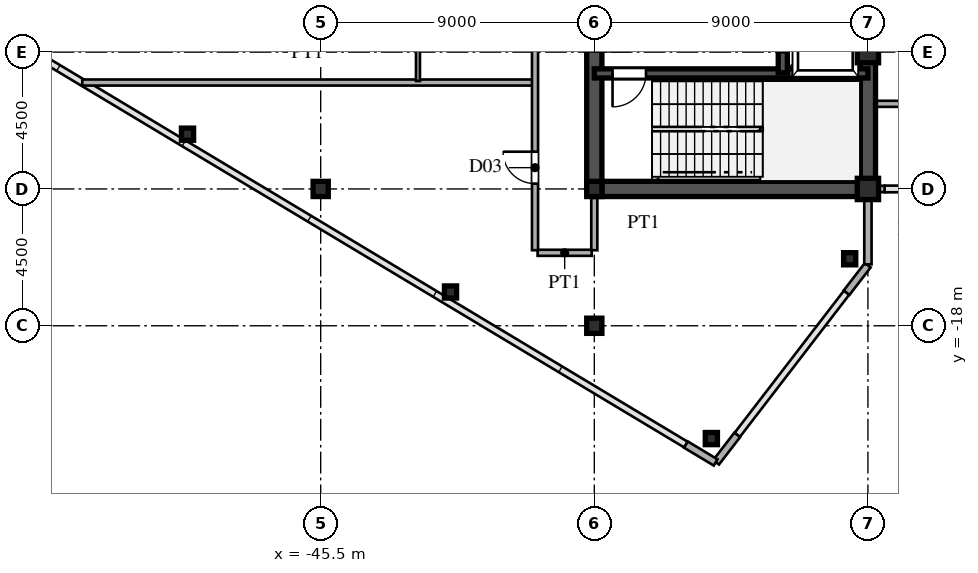
"""IFC4 building model, lengths in metres.
Left out: names, types, materials, properties, quantities, classifications, styles, units other than length and angle.
Written with IfcOpenShell. Run it as: python <this file> out.ifc"""

import sys

from ifc_helpers import new_model, si_unit, direction, frame, frame_2d, origin, origin_2d, place, context, subcontext, project, spatial, rectangle, hollow_rectangle, i_section, extrude, source, transform, mapped, element, fill, save


model = new_model("IFC4")
c1 = context("Model", 3, precision=1e-05, world=origin(), true_north=direction((0.0, 1.0)))
c2 = subcontext(c1, "Body", "Model", "MODEL_VIEW")
j1 = project(units=[si_unit("LENGTHUNIT", "METRE"), si_unit("PLANEANGLEUNIT", "RADIAN")], contexts=[c1])
p1 = place(None, origin())
s1 = spatial("IfcSite", under=j1, at=p1, CompositionType="ELEMENT")
p2 = place(p1, origin())
s2 = spatial("IfcBuilding", under=s1, at=p2, CompositionType="ELEMENT")
p3 = place(p2, frame((0.0, 0.0, 234.6)))
s3 = spatial("IfcBuildingStorey", under=s2, at=p3, CompositionType="ELEMENT", Elevation=234.6)
m1 = source(origin(), c2, "Body", "SweptSolid", [
    extrude(hollow_rectangle(XDim=0.7, YDim=0.7, WallThickness=0.03, at=origin_2d()), origin(), (0.0, 0.0, 1.0), 4.8),
])
for number, where, z_axis, x_axis in (
    (1, (-27.5, -13.5, 0.0), (0.0, 0.0, 1.0), (1.0, 0.0, 0.0)),
    (2, (-27.5, -9.0, 0.0), (0.0, 0.0, 1.0), (1.0, 0.0, 0.0)),
):
    element("IfcColumn", number, at=place(p3, frame(where, z_axis=z_axis, x_axis=x_axis)), inside=s3, PredefinedType="COLUMN", context=c2, shape_type="MappedRepresentation", body=[
        mapped(m1, transform((0.0, 0.0, 0.0), scale=1.0)),
    ])
m2 = source(origin(), c2, "Body", "SweptSolid", [
    extrude(i_section(OverallWidth=0.5, OverallDepth=0.5, WebThickness=0.02, FlangeThickness=0.032, at=origin_2d()), origin(), (0.0, 0.0, 1.0), 4.8),
])
for number, where, z_axis, x_axis in (
    (3, (-36.5, -18.0, 0.0), (0.0, 0.0, 1.0), (1.0, 0.0, 0.0)),
    (4, (-36.5, -13.5, 0.0), (0.0, 0.0, 1.0), (1.0, 0.0, 0.0)),
    (5, (-45.5, -13.5, 0.0), (0.0, 0.0, 1.0), (1.0, 0.0, 0.0)),
):
    element("IfcColumn", number, at=place(p3, frame(where, z_axis=z_axis, x_axis=x_axis)), inside=s3, PredefinedType="COLUMN", context=c2, shape_type="MappedRepresentation", body=[
        mapped(m2, transform((0.0, 0.0, 0.0), scale=1.0)),
    ])
m3 = source(origin(), c2, "Body", "SweptSolid", [
    extrude(hollow_rectangle(XDim=0.4, YDim=0.4, WallThickness=0.016, at=origin_2d()), origin(), (0.0, 0.0, 1.0), 4.8),
])
for number, where, z_axis, x_axis in (
    (6, (-28.1, -15.796, 0.0), (0.0, 0.0, 1.0), (1.0, 0.0, 0.0)),
    (7, (-32.65, -21.71, 0.0), (0.0, 0.0, 1.0), (1.0, 0.0, 0.0)),
    (8, (-41.23, -16.889, 0.0), (0.0, 0.0, 1.0), (1.0, 0.0, 0.0)),
    (9, (-49.88, -11.699, 0.0), (0.0, 0.0, 1.0), (1.0, 0.0, 0.0)),
):
    element("IfcColumn", number, at=place(p3, frame(where, z_axis=z_axis, x_axis=x_axis)), inside=s3, PredefinedType="COLUMN", context=c2, shape_type="MappedRepresentation", body=[
        mapped(m3, transform((0.0, 0.0, 0.0), scale=1.0)),
    ])
p4 = place(p3, frame((-27.5, -15.98, 0.0), z_axis=(0.0, 0.0, 1.0), x_axis=(0.0, 1.0, 0.0)))
e10 = element("IfcWall", 10, at=p4, inside=s3, PredefinedType="SOLIDWALL", context=c2, shape_type="SweptSolid", body=[
    extrude(rectangle(XDim=1.605, YDim=0.24, at=frame_2d((0.803, 0.0))), origin(), (0.0, 0.0, 1.0), 4.58),
])
p5 = place(p3, frame((-27.5, -14.375, 0.0), z_axis=(0.0, 0.0, 1.0), x_axis=(0.0, 1.0, 0.0)))
e11 = element("IfcWall", 11, at=p5, inside=s3, PredefinedType="SOLIDWALL", context=c2, shape_type="SweptSolid", body=[
    extrude(rectangle(XDim=0.62, YDim=0.24, at=frame_2d((0.31, 0.0))), origin(), (0.0, 0.0, 1.0), 4.08),
])
for number, where, z_axis, x_axis in (
    (12, (-33.486, -21.908, 0.0), (0.0, 0.0, 1.0), (0.857, -0.515, 0.0)),
    (13, (-32.494, -22.492, 0.0), (0.0, 0.0, 1.0), (0.61, 0.793, 0.0)),
    (14, (-28.201, -16.912, 0.0), (0.0, 0.0, 1.0), (0.61, 0.793, 0.0)),
):
    element("IfcWall", number, at=place(p3, frame(where, z_axis=z_axis, x_axis=x_axis)), inside=s3, PredefinedType="SOLIDWALL", context=c2, shape_type="SweptSolid", body=[
        extrude(rectangle(XDim=1.14, YDim=0.24, at=frame_2d((0.57, 0.0))), origin(), (0.0, 0.0, 1.0), 4.58),
    ])
p6 = place(p3, frame((-27.49, -13.5, 0.0), z_axis=(0.0, 0.0, 1.0), x_axis=(1.0, 0.0, 0.0)))
e15 = element("IfcWall", 15, at=p6, inside=s3, PredefinedType="SOLIDWALL", context=c2, shape_type="SweptSolid", body=[
    extrude(rectangle(XDim=0.54, YDim=0.21, at=frame_2d((0.27, 0.0))), origin(), (0.0, 0.0, 1.0), 2.78),
])
p7 = place(p3, frame((-27.5, -13.5, 0.0), z_axis=(0.0, 0.0, 1.0), x_axis=(0.0, 1.0, 0.0)))
e16 = element("IfcWall", 16, at=p7, inside=s3, PredefinedType="SHEAR", context=c2, shape_type="SweptSolid", body=[
    extrude(rectangle(XDim=12.2, YDim=0.5, at=frame_2d((6.1, 0.0))), origin(), (0.0, 0.0, 1.0), 4.58),
])
p8 = place(p3, frame((-36.5, -13.5, 0.0), z_axis=(0.0, 0.0, 1.0), x_axis=(1.0, 0.0, 0.0)))
e17 = element("IfcWall", 17, at=p8, inside=s3, PredefinedType="SHEAR", context=c2, shape_type="SweptSolid", body=[
    extrude(rectangle(XDim=9.0, YDim=0.5, at=frame_2d((4.5, 0.0))), origin(), (0.0, 0.0, 1.0), 4.58),
])
p9 = place(p3, frame((-36.5, -13.65, 0.0), z_axis=(0.0, 0.0, 1.0), x_axis=(0.0, 1.0, 0.0)))
e18 = element("IfcWall", 18, at=p9, inside=s3, PredefinedType="SHEAR", context=c2, shape_type="SweptSolid", body=[
    extrude(rectangle(XDim=7.15, YDim=0.5, at=frame_2d((3.575, 0.0))), origin(), (0.0, 0.0, 1.0), 4.58),
])
p10 = place(p9, frame((4.675, 0.0, 0.0)))
e19 = element("IfcOpeningElement", 19, at=p10, cuts=e18, PredefinedType="OPENING", context=c2, shape_type="SweptSolid", body=[
    extrude(rectangle(XDim=1.15, YDim=2.2, at=frame_2d((0.575, 1.1))), frame((0.0, 0.26, 0.0), z_axis=(0.0, -1.0, 0.0), x_axis=(1.0, 0.0, 0.0)), (0.0, 0.0, 1.0), 0.52),
])
p11 = place(p3, frame((-36.5, -9.7, 0.0), z_axis=(0.0, 0.0, 1.0), x_axis=(1.0, 0.0, 0.0)))
e20 = element("IfcWall", 20, at=p11, inside=s3, PredefinedType="SHEAR", context=c2, shape_type="SweptSolid", body=[
    extrude(rectangle(XDim=9.0, YDim=0.3, at=frame_2d((4.5, 0.0))), origin(), (0.0, 0.0, 1.0), 4.58),
])
p12 = place(p11, frame((0.6, 0.0, 0.0)))
e21 = element("IfcOpeningElement", 21, at=p12, cuts=e20, PredefinedType="OPENING", context=c2, shape_type="SweptSolid", body=[
    extrude(rectangle(XDim=1.1, YDim=2.2, at=frame_2d((0.55, 1.1))), frame((0.0, 0.16, 0.0), z_axis=(0.0, -1.0, 0.0), x_axis=(1.0, 0.0, 0.0)), (0.0, 0.0, 1.0), 0.32),
])
p13 = place(p3, frame((-30.3, -9.68, 0.0), z_axis=(0.0, 0.0, 1.0), x_axis=(0.0, 1.0, 0.0)))
e22 = element("IfcWall", 22, at=p13, inside=s3, PredefinedType="SHEAR", context=c2, shape_type="SweptSolid", body=[
    extrude(rectangle(XDim=2.56, YDim=0.3, at=frame_2d((1.28, 0.0))), origin(), (0.0, 0.0, 1.0), 4.58),
])
p14 = place(p13, frame((0.68, 0.0, 0.0)))
e23 = element("IfcOpeningElement", 23, at=p14, cuts=e22, PredefinedType="OPENING", context=c2, shape_type="SweptSolid", body=[
    extrude(rectangle(XDim=1.2, YDim=2.25, at=frame_2d((0.6, 1.125))), frame((0.0, 0.16, 0.0), z_axis=(0.0, -1.0, 0.0), x_axis=(1.0, 0.0, 0.0)), (0.0, 0.0, 1.0), 0.32),
])
p15 = place(p3, frame((-38.365, -15.6, 0.0), z_axis=(0.0, 0.0, 1.0), x_axis=(1.0, 0.0, 0.0)))
e24 = element("IfcWall", 24, at=p15, inside=s3, PredefinedType="PARTITIONING", context=c2, shape_type="SweptSolid", body=[
    extrude(rectangle(XDim=1.78, YDim=0.2, at=frame_2d((0.89, 0.0))), origin(), (0.0, 0.0, 1.0), 4.58),
])
p16 = place(p3, frame((-27.245, -10.7, 0.0), z_axis=(0.0, 0.0, 1.0), x_axis=(1.0, 0.0, 0.0)))
e25 = element("IfcWall", 25, at=p16, inside=s3, PredefinedType="PARTITIONING", context=c2, shape_type="SweptSolid", body=[
    extrude(rectangle(XDim=54.49, YDim=0.2, at=frame_2d((27.245, 0.0))), origin(), (0.0, 0.0, 1.0), 4.58),
])
p17 = place(p16, frame((25.77, 0.0, 0.0)))
e26 = element("IfcOpeningElement", 26, at=p17, cuts=e25, PredefinedType="OPENING", context=c2, shape_type="SweptSolid", body=[
    extrude(rectangle(XDim=1.15, YDim=2.2, at=frame_2d((0.575, 1.1))), frame((0.0, 0.11, 0.0), z_axis=(0.0, -1.0, 0.0), x_axis=(1.0, 0.0, 0.0)), (0.0, 0.0, 1.0), 0.22),
])
p18 = place(p3, frame((-53.343, -10.0, 0.0), z_axis=(0.0, 0.0, 1.0), x_axis=(1.0, 0.0, 0.0)))
e27 = element("IfcWall", 27, at=p18, inside=s3, PredefinedType="PARTITIONING", context=c2, shape_type="SweptSolid", body=[
    extrude(rectangle(XDim=14.813, YDim=0.2, at=frame_2d((7.406, 0.0))), origin(), (0.0, 0.0, 1.0), 4.58),
])
p19 = place(p3, frame((-42.3, -9.95, 0.0), z_axis=(0.0, 0.0, 1.0), x_axis=(0.0, 1.0, 0.0)))
e28 = element("IfcWall", 28, at=p19, inside=s3, PredefinedType="PARTITIONING", context=c2, shape_type="SweptSolid", body=[
    extrude(rectangle(XDim=3.3, YDim=0.13, at=frame_2d((1.65, 0.0))), origin(), (0.0, 0.0, 1.0), 4.58),
])
p20 = place(p3, frame((-38.45, -15.515, 0.0), z_axis=(0.0, 0.0, 1.0), x_axis=(0.0, 1.0, 0.0)))
e29 = element("IfcWall", 29, at=p20, inside=s3, PredefinedType="PARTITIONING", context=c2, shape_type="SweptSolid", body=[
    extrude(rectangle(XDim=31.03, YDim=0.2, at=frame_2d((15.515, 0.0))), origin(), (0.0, 0.0, 1.0), 4.58),
])
p21 = place(p20, frame((2.19, 0.0, 0.0)))
e30 = element("IfcOpeningElement", 30, at=p21, cuts=e29, PredefinedType="OPENING", context=c2, shape_type="SweptSolid", body=[
    extrude(rectangle(XDim=1.05, YDim=2.25, at=frame_2d((0.525, 1.125))), frame((0.0, 0.11, 0.0), z_axis=(0.0, -1.0, 0.0), x_axis=(1.0, 0.0, 0.0)), (0.0, 0.0, 1.0), 0.22),
])
p22 = place(p20, frame((11.101, 0.0, 0.0)))
e31 = element("IfcOpeningElement", 31, at=p22, cuts=e29, PredefinedType="OPENING", context=c2, shape_type="SweptSolid", body=[
    extrude(rectangle(XDim=1.05, YDim=2.25, at=frame_2d((0.525, 1.125))), frame((0.0, 0.11, 0.0), z_axis=(0.0, -1.0, 0.0), x_axis=(1.0, 0.0, 0.0)), (0.0, 0.0, 1.0), 0.22),
])
p23 = place(p20, frame((24.09, 0.0, 0.0)))
e32 = element("IfcOpeningElement", 32, at=p23, cuts=e29, PredefinedType="OPENING", context=c2, shape_type="SweptSolid", body=[
    extrude(rectangle(XDim=1.05, YDim=2.25, at=frame_2d((0.525, 1.125))), frame((0.0, 0.11, 0.0), z_axis=(0.0, -1.0, 0.0), x_axis=(1.0, 0.0, 0.0)), (0.0, 0.0, 1.0), 0.22),
])
p24 = place(p3, frame((-36.5, -15.515, 0.0), z_axis=(0.0, 0.0, 1.0), x_axis=(0.0, 1.0, 0.0)))
e33 = element("IfcWall", 33, at=p24, inside=s3, PredefinedType="PARTITIONING", context=c2, shape_type="SweptSolid", body=[
    extrude(rectangle(XDim=1.76, YDim=0.2, at=frame_2d((0.88, 0.0))), origin(), (0.0, 0.0, 1.0), 3.98),
])
m4 = source(origin(), c2, "Body", "SweptSolid", [
    extrude(rectangle(XDim=1.1, YDim=2.2, at=frame_2d((0.55, 1.1))), frame((0.0, 0.025, 0.0), z_axis=(0.0, -1.0, 0.0), x_axis=(1.0, 0.0, 0.0)), (0.0, 0.0, 1.0), 0.05),
])
p25 = place(p12, frame((1.1, 0.0, 0.0), z_axis=(0.0, 0.0, 1.0), x_axis=(-1.0, 0.0, 0.0)))
e34 = element("IfcDoor", 34, at=p25, inside=s3, OperationType="SINGLE_SWING_LEFT", PredefinedType="DOOR", context=c2, shape_type="MappedRepresentation", body=[
    mapped(m4, transform((0.0, 0.0, 0.0), scale=1.0)),
])
fill(e21, e34)
m5 = source(origin(), c2, "Body", "SweptSolid", [
    extrude(rectangle(XDim=1.05, YDim=2.25, at=frame_2d((0.525, 1.125))), frame((0.0, 0.025, 0.0), z_axis=(0.0, -1.0, 0.0), x_axis=(1.0, 0.0, 0.0)), (0.0, 0.0, 1.0), 0.05),
])
p26 = place(p21, origin())
e35 = element("IfcDoor", 35, at=p26, inside=s3, OperationType="SINGLE_SWING_RIGHT", PredefinedType="DOOR", context=c2, shape_type="MappedRepresentation", body=[
    mapped(m5, transform((0.0, 0.0, 0.0), scale=1.0)),
])
fill(e30, e35)
save(model, sys.argv[1])
